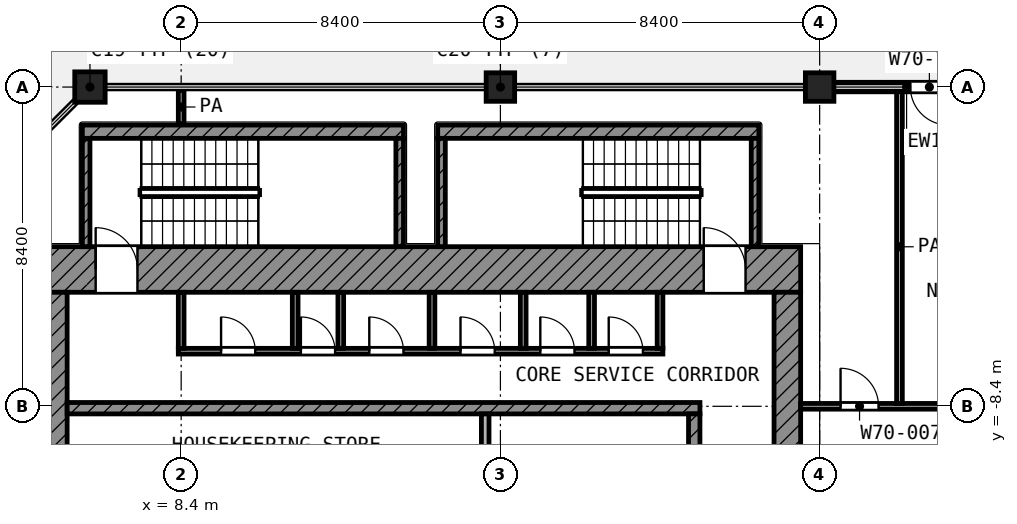
"""IFC4 building model, lengths in metres.
Left out: names, types, materials, properties, quantities, classifications, styles, units other than length and angle.
Written with IfcOpenShell. Run it as: python <this file> out.ifc"""

import sys

from ifc_helpers import new_model, si_unit, direction, frame, frame_2d, origin, origin_2d, place, context, subcontext, project, spatial, rectangle, extrude, element, fill, save


model = new_model("IFC4")
c1 = context("Model", 3, precision=1e-05, world=origin(), true_north=direction((0.0, 1.0)))
c2 = subcontext(c1, "Body", "Model", "MODEL_VIEW")
j1 = project(units=[si_unit("LENGTHUNIT", "METRE"), si_unit("PLANEANGLEUNIT", "RADIAN")], contexts=[c1])
p1 = place(None, origin())
s1 = spatial("IfcSite", under=j1, at=p1, CompositionType="ELEMENT")
p2 = place(p1, origin())
s2 = spatial("IfcBuilding", under=s1, at=p2, CompositionType="ELEMENT")
p3 = place(p2, frame((0.0, 0.0, 323.8)))
s3 = spatial("IfcBuildingStorey", under=s2, at=p3, CompositionType="ELEMENT", Elevation=323.8)
p4 = place(p3, frame((6.0, 0.0, 0.0), z_axis=(0.0, 0.0, 1.0), x_axis=(1.0, 0.0, 0.0)))
e1 = element("IfcColumn", 1, at=p4, inside=s3, PredefinedType="COLUMN", context=c2, shape_type="SweptSolid", body=[
    extrude(rectangle(XDim=0.8, YDim=0.8, at=origin_2d()), origin(), (0.0, 0.0, 1.0), 4.2),
])
for number, where, z_axis, x_axis in (
    (2, (16.8, 0.0, 0.0), (0.0, 0.0, 1.0), (1.0, 0.0, 0.0)),
    (3, (25.2, 0.0, 0.0), (0.0, 0.0, 1.0), (1.0, 0.0, 0.0)),
):
    element("IfcColumn", number, at=place(p3, frame(where, z_axis=z_axis, x_axis=x_axis)), inside=s3, PredefinedType="COLUMN", context=c2, shape_type="SweptSolid", body=[
        extrude(rectangle(XDim=0.75, YDim=0.75, at=origin_2d()), origin(), (0.0, 0.0, 1.0), 4.2),
    ])
p5 = place(p3, frame((29.4, 0.0, 0.0), z_axis=(0.0, 0.0, 1.0), x_axis=(-1.0, 0.0, 0.0)))
e4 = element("IfcWall", 4, at=p5, inside=s3, PredefinedType="SOLIDWALL", context=c2, shape_type="SweptSolid", body=[
    extrude(rectangle(XDim=3.825, YDim=0.25, at=frame_2d((1.913, 0.0))), origin(), (0.0, 0.0, 1.0), 3.48),
])
p6 = place(p5, frame((0.812, 0.0, 0.0)))
e5 = element("IfcOpeningElement", 5, at=p6, cuts=e4, PredefinedType="OPENING", context=c2, shape_type="SweptSolid", body=[
    extrude(rectangle(XDim=1.0, YDim=2.1, at=frame_2d((0.5, 1.05))), frame((0.0, 0.135, 0.0), z_axis=(0.0, -1.0, 0.0), x_axis=(1.0, 0.0, 0.0)), (0.0, 0.0, 1.0), 0.27),
])
p7 = place(p3, frame((4.2, -4.8, 0.0), z_axis=(0.0, 0.0, 1.0), x_axis=(1.0, 0.0, 0.0)))
e6 = element("IfcWall", 6, at=p7, inside=s3, PredefinedType="SHEAR", context=c2, shape_type="SweptSolid", body=[
    extrude(rectangle(XDim=20.5, YDim=1.2, at=frame_2d((10.25, 0.0))), origin(), (0.0, 0.0, 1.0), 3.6),
])
p8 = place(p7, frame((1.95, 0.0, 0.0)))
e7 = element("IfcOpeningElement", 7, at=p8, cuts=e6, PredefinedType="OPENING", context=c2, shape_type="SweptSolid", body=[
    extrude(rectangle(XDim=1.1, YDim=2.1, at=frame_2d((0.55, 1.05))), frame((0.0, 0.61, 0.0), z_axis=(0.0, -1.0, 0.0), x_axis=(1.0, 0.0, 0.0)), (0.0, 0.0, 1.0), 1.22),
])
p9 = place(p7, frame((17.95, 0.0, 0.0)))
e8 = element("IfcOpeningElement", 8, at=p9, cuts=e6, PredefinedType="OPENING", context=c2, shape_type="SweptSolid", body=[
    extrude(rectangle(XDim=1.1, YDim=2.1, at=frame_2d((0.55, 1.05))), frame((0.0, 0.61, 0.0), z_axis=(0.0, -1.0, 0.0), x_axis=(1.0, 0.0, 0.0)), (0.0, 0.0, 1.0), 1.22),
])
p10 = place(p3, frame((4.8, -24.7, 0.0), z_axis=(0.0, 0.0, 1.0), x_axis=(0.0, 1.0, 0.0)))
e9 = element("IfcWall", 9, at=p10, inside=s3, PredefinedType="SHEAR", context=c2, shape_type="SweptSolid", body=[
    extrude(rectangle(XDim=19.3, YDim=1.2, at=frame_2d((9.65, 0.0))), origin(), (0.0, 0.0, 1.0), 3.6),
])
p11 = place(p10, frame((11.15, 0.0, 0.0)))
e10 = element("IfcOpeningElement", 10, at=p11, cuts=e9, PredefinedType="OPENING", context=c2, shape_type="SweptSolid", body=[
    extrude(rectangle(XDim=1.1, YDim=2.1, at=frame_2d((0.55, 1.05))), frame((0.0, 0.61, 0.0), z_axis=(0.0, -1.0, 0.0), x_axis=(1.0, 0.0, 0.0)), (0.0, 0.0, 1.0), 1.22),
])
p12 = place(p10, frame((1.85, 0.0, 0.0)))
e11 = element("IfcOpeningElement", 11, at=p12, cuts=e9, PredefinedType="OPENING", context=c2, shape_type="SweptSolid", body=[
    extrude(rectangle(XDim=1.1, YDim=2.1, at=frame_2d((0.55, 1.05))), frame((0.0, 0.61, 0.0), z_axis=(0.0, -1.0, 0.0), x_axis=(1.0, 0.0, 0.0)), (0.0, 0.0, 1.0), 1.22),
])
p13 = place(p3, frame((24.35, -24.0, 0.0), z_axis=(0.0, 0.0, 1.0), x_axis=(0.0, 1.0, 0.0)))
e12 = element("IfcWall", 12, at=p13, inside=s3, PredefinedType="SHEAR", context=c2, shape_type="SweptSolid", body=[
    extrude(rectangle(XDim=18.6, YDim=0.7, at=frame_2d((9.3, 0.0))), origin(), (0.0, 0.0, 1.0), 3.6),
])
p14 = place(p13, frame((10.5, 0.0, 0.0)))
e13 = element("IfcOpeningElement", 13, at=p14, cuts=e12, PredefinedType="OPENING", context=c2, shape_type="SweptSolid", body=[
    extrude(rectangle(XDim=1.8, YDim=2.1, at=frame_2d((0.9, 1.05))), frame((0.0, 0.36, 0.0), z_axis=(0.0, -1.0, 0.0), x_axis=(1.0, 0.0, 0.0)), (0.0, 0.0, 1.0), 0.72),
])
p15 = place(p3, frame((5.4, -8.45, 0.0), z_axis=(0.0, 0.0, 1.0), x_axis=(1.0, 0.0, 0.0)))
e14 = element("IfcWall", 14, at=p15, inside=s3, PredefinedType="SHEAR", context=c2, shape_type="SweptSolid", body=[
    extrude(rectangle(XDim=16.65, YDim=0.3, at=frame_2d((8.325, 0.0))), origin(), (0.0, 0.0, 1.0), 3.6),
])
p16 = place(p3, frame((21.9, -10.95, 0.0), z_axis=(0.0, 0.0, 1.0), x_axis=(0.0, 1.0, 0.0)))
e15 = element("IfcWall", 15, at=p16, inside=s3, PredefinedType="SHEAR", context=c2, shape_type="SweptSolid", body=[
    extrude(rectangle(XDim=2.35, YDim=0.3, at=frame_2d((1.175, 0.0))), origin(), (0.0, 0.0, 1.0), 3.6),
])
p17 = place(p3, frame((16.4, -10.95, 0.0), z_axis=(0.0, 0.0, 1.0), x_axis=(0.0, 1.0, 0.0)))
e16 = element("IfcWall", 16, at=p17, inside=s3, PredefinedType="PARTITIONING", context=c2, shape_type="SweptSolid", body=[
    extrude(rectangle(XDim=2.35, YDim=0.2, at=frame_2d((1.175, 0.0))), origin(), (0.0, 0.0, 1.0), 3.6),
])
p18 = place(p3, frame((8.325, -6.95, 0.0), z_axis=(0.0, 0.0, 1.0), x_axis=(1.0, 0.0, 0.0)))
e17 = element("IfcWall", 17, at=p18, inside=s3, PredefinedType="PARTITIONING", context=c2, shape_type="SweptSolid", body=[
    extrude(rectangle(XDim=12.75, YDim=0.15, at=frame_2d((6.375, 0.0))), origin(), (0.0, 0.0, 1.0), 3.6),
])
p19 = place(p18, frame((1.125, 0.0, 0.0)))
e18 = element("IfcOpeningElement", 18, at=p19, cuts=e17, PredefinedType="OPENING", context=c2, shape_type="SweptSolid", body=[
    extrude(rectangle(XDim=0.9, YDim=2.1, at=frame_2d((0.45, 1.05))), frame((0.0, 0.085, 0.0), z_axis=(0.0, -1.0, 0.0), x_axis=(1.0, 0.0, 0.0)), (0.0, 0.0, 1.0), 0.17),
])
p20 = place(p18, frame((3.225, 0.0, 0.0)))
e19 = element("IfcOpeningElement", 19, at=p20, cuts=e17, PredefinedType="OPENING", context=c2, shape_type="SweptSolid", body=[
    extrude(rectangle(XDim=0.9, YDim=2.1, at=frame_2d((0.45, 1.05))), frame((0.0, 0.085, 0.0), z_axis=(0.0, -1.0, 0.0), x_axis=(1.0, 0.0, 0.0)), (0.0, 0.0, 1.0), 0.17),
])
p21 = place(p18, frame((5.025, 0.0, 0.0)))
e20 = element("IfcOpeningElement", 20, at=p21, cuts=e17, PredefinedType="OPENING", context=c2, shape_type="SweptSolid", body=[
    extrude(rectangle(XDim=0.9, YDim=2.1, at=frame_2d((0.45, 1.05))), frame((0.0, 0.085, 0.0), z_axis=(0.0, -1.0, 0.0), x_axis=(1.0, 0.0, 0.0)), (0.0, 0.0, 1.0), 0.17),
])
p22 = place(p18, frame((7.425, 0.0, 0.0)))
e21 = element("IfcOpeningElement", 21, at=p22, cuts=e17, PredefinedType="OPENING", context=c2, shape_type="SweptSolid", body=[
    extrude(rectangle(XDim=0.9, YDim=2.1, at=frame_2d((0.45, 1.05))), frame((0.0, 0.085, 0.0), z_axis=(0.0, -1.0, 0.0), x_axis=(1.0, 0.0, 0.0)), (0.0, 0.0, 1.0), 0.17),
])
p23 = place(p18, frame((9.525, 0.0, 0.0)))
e22 = element("IfcOpeningElement", 22, at=p23, cuts=e17, PredefinedType="OPENING", context=c2, shape_type="SweptSolid", body=[
    extrude(rectangle(XDim=0.9, YDim=2.1, at=frame_2d((0.45, 1.05))), frame((0.0, 0.085, 0.0), z_axis=(0.0, -1.0, 0.0), x_axis=(1.0, 0.0, 0.0)), (0.0, 0.0, 1.0), 0.17),
])
p24 = place(p18, frame((11.325, 0.0, 0.0)))
e23 = element("IfcOpeningElement", 23, at=p24, cuts=e17, PredefinedType="OPENING", context=c2, shape_type="SweptSolid", body=[
    extrude(rectangle(XDim=0.9, YDim=2.1, at=frame_2d((0.45, 1.05))), frame((0.0, 0.085, 0.0), z_axis=(0.0, -1.0, 0.0), x_axis=(1.0, 0.0, 0.0)), (0.0, 0.0, 1.0), 0.17),
])
for number, where, z_axis, x_axis in (
    (24, (8.4, -6.875, 0.0), (0.0, 0.0, 1.0), (0.0, 1.0, 0.0)),
    (25, (11.4, -6.875, 0.0), (0.0, 0.0, 1.0), (0.0, 1.0, 0.0)),
    (26, (12.6, -6.875, 0.0), (0.0, 0.0, 1.0), (0.0, 1.0, 0.0)),
    (27, (15.0, -6.875, 0.0), (0.0, 0.0, 1.0), (0.0, 1.0, 0.0)),
    (28, (17.4, -6.875, 0.0), (0.0, 0.0, 1.0), (0.0, 1.0, 0.0)),
    (29, (19.2, -6.875, 0.0), (0.0, 0.0, 1.0), (0.0, 1.0, 0.0)),
    (30, (21.0, -6.875, 0.0), (0.0, 0.0, 1.0), (0.0, 1.0, 0.0)),
):
    element("IfcWall", number, at=place(p3, frame(where, z_axis=z_axis, x_axis=x_axis)), inside=s3, PredefinedType="PARTITIONING", context=c2, shape_type="SweptSolid", body=[
        extrude(rectangle(XDim=1.475, YDim=0.15, at=frame_2d((0.738, 0.0))), origin(), (0.0, 0.0, 1.0), 3.6),
    ])
p25 = place(p3, frame((5.8, -1.175, 0.0), z_axis=(0.0, 0.0, 1.0), x_axis=(1.0, 0.0, 0.0)))
e31 = element("IfcWall", 31, at=p25, inside=s3, PredefinedType="SHEAR", context=c2, shape_type="SweptSolid", body=[
    extrude(rectangle(XDim=8.45, YDim=0.35, at=frame_2d((4.225, 0.0))), origin(), (0.0, 0.0, 1.0), 3.6),
])
for number, where, z_axis, x_axis in (
    (32, (5.9, -4.2, 0.0), (0.0, 0.0, 1.0), (0.0, 1.0, 0.0)),
    (33, (14.15, -4.2, 0.0), (0.0, 0.0, 1.0), (0.0, 1.0, 0.0)),
):
    element("IfcWall", number, at=place(p3, frame(where, z_axis=z_axis, x_axis=x_axis)), inside=s3, PredefinedType="SHEAR", context=c2, shape_type="SweptSolid", body=[
        extrude(rectangle(XDim=2.85, YDim=0.2, at=frame_2d((1.425, 0.0))), origin(), (0.0, 0.0, 1.0), 3.6),
    ])
p26 = place(p3, frame((15.15, -1.175, 0.0), z_axis=(0.0, 0.0, 1.0), x_axis=(1.0, 0.0, 0.0)))
e34 = element("IfcWall", 34, at=p26, inside=s3, PredefinedType="SHEAR", context=c2, shape_type="SweptSolid", body=[
    extrude(rectangle(XDim=8.45, YDim=0.35, at=frame_2d((4.225, 0.0))), origin(), (0.0, 0.0, 1.0), 3.6),
])
for number, where, z_axis, x_axis in (
    (35, (15.25, -4.2, 0.0), (0.0, 0.0, 1.0), (0.0, 1.0, 0.0)),
    (36, (23.5, -4.2, 0.0), (0.0, 0.0, 1.0), (0.0, 1.0, 0.0)),
):
    element("IfcWall", number, at=place(p3, frame(where, z_axis=z_axis, x_axis=x_axis)), inside=s3, PredefinedType="SHEAR", context=c2, shape_type="SweptSolid", body=[
        extrude(rectangle(XDim=2.85, YDim=0.2, at=frame_2d((1.425, 0.0))), origin(), (0.0, 0.0, 1.0), 3.6),
    ])
p27 = place(p3, frame((24.7, -8.4, 0.0), z_axis=(0.0, 0.0, 1.0), x_axis=(1.0, 0.0, 0.0)))
e37 = element("IfcWall", 37, at=p27, inside=s3, PredefinedType="PARTITIONING", context=c2, shape_type="SweptSolid", body=[
    extrude(rectangle(XDim=15.582, YDim=0.15, at=frame_2d((7.791, 0.0))), origin(), (0.0, 0.0, 1.0), 3.6),
])
p28 = place(p27, frame((9.35, 0.0, 0.0)))
e38 = element("IfcOpeningElement", 38, at=p28, cuts=e37, PredefinedType="OPENING", context=c2, shape_type="SweptSolid", body=[
    extrude(rectangle(XDim=1.1, YDim=2.1, at=frame_2d((0.55, 1.05))), frame((0.0, 0.085, 0.0), z_axis=(0.0, -1.0, 0.0), x_axis=(1.0, 0.0, 0.0)), (0.0, 0.0, 1.0), 0.17),
])
p29 = place(p27, frame((1.05, 0.0, 0.0)))
e39 = element("IfcOpeningElement", 39, at=p29, cuts=e37, PredefinedType="OPENING", context=c2, shape_type="SweptSolid", body=[
    extrude(rectangle(XDim=1.0, YDim=2.1, at=frame_2d((0.5, 1.05))), frame((0.0, 0.085, 0.0), z_axis=(0.0, -1.0, 0.0), x_axis=(1.0, 0.0, 0.0)), (0.0, 0.0, 1.0), 0.17),
])
p30 = place(p27, frame((5.15, 0.0, 0.0)))
e40 = element("IfcOpeningElement", 40, at=p30, cuts=e37, PredefinedType="OPENING", context=c2, shape_type="SweptSolid", body=[
    extrude(rectangle(XDim=1.2, YDim=2.1, at=frame_2d((0.6, 1.05))), frame((0.0, 0.085, 0.0), z_axis=(0.0, -1.0, 0.0), x_axis=(1.0, 0.0, 0.0)), (0.0, 0.0, 1.0), 0.17),
])
p31 = place(p3, frame((8.4, -0.97, 0.0), z_axis=(0.0, 0.0, 1.0), x_axis=(0.0, 1.0, 0.0)))
e41 = element("IfcWall", 41, at=p31, inside=s3, PredefinedType="PARTITIONING", context=c2, shape_type="SweptSolid", body=[
    extrude(rectangle(XDim=0.89, YDim=0.15, at=frame_2d((0.445, 0.0))), origin(), (0.0, 0.0, 1.0), 3.6),
])
p32 = place(p3, frame((27.3, -8.325, 0.0), z_axis=(0.0, 0.0, 1.0), x_axis=(0.0, 1.0, 0.0)))
e42 = element("IfcWall", 42, at=p32, inside=s3, PredefinedType="PARTITIONING", context=c2, shape_type="SweptSolid", body=[
    extrude(rectangle(XDim=8.245, YDim=0.15, at=frame_2d((4.123, 0.0))), origin(), (0.0, 0.0, 1.0), 3.6),
])
p33 = place(p6, origin())
e43 = element("IfcDoor", 43, at=p33, inside=s3, OperationType="SINGLE_SWING_LEFT", PredefinedType="DOOR", context=c2, shape_type="SweptSolid", body=[
    extrude(rectangle(XDim=1.0, YDim=2.1, at=frame_2d((0.5, 1.05))), frame((0.0, 0.025, 0.0), z_axis=(0.0, -1.0, 0.0), x_axis=(1.0, 0.0, 0.0)), (0.0, 0.0, 1.0), 0.05),
])
fill(e5, e43)
p34 = place(p8, origin())
e44 = element("IfcDoor", 44, at=p34, inside=s3, OperationType="SINGLE_SWING_LEFT", PredefinedType="DOOR", context=c2, shape_type="SweptSolid", body=[
    extrude(rectangle(XDim=1.1, YDim=2.1, at=frame_2d((0.55, 1.05))), frame((0.0, 0.025, 0.0), z_axis=(0.0, -1.0, 0.0), x_axis=(1.0, 0.0, 0.0)), (0.0, 0.0, 1.0), 0.05),
])
fill(e7, e44)
p35 = place(p9, origin())
e45 = element("IfcDoor", 45, at=p35, inside=s3, OperationType="SINGLE_SWING_LEFT", PredefinedType="DOOR", context=c2, shape_type="SweptSolid", body=[
    extrude(rectangle(XDim=1.1, YDim=2.1, at=frame_2d((0.55, 1.05))), frame((0.0, 0.025, 0.0), z_axis=(0.0, -1.0, 0.0), x_axis=(1.0, 0.0, 0.0)), (0.0, 0.0, 1.0), 0.05),
])
fill(e8, e45)
p36 = place(p19, origin())
e46 = element("IfcDoor", 46, at=p36, inside=s3, OperationType="SINGLE_SWING_LEFT", PredefinedType="DOOR", context=c2, shape_type="SweptSolid", body=[
    extrude(rectangle(XDim=0.9, YDim=2.1, at=frame_2d((0.45, 1.05))), frame((0.0, 0.025, 0.0), z_axis=(0.0, -1.0, 0.0), x_axis=(1.0, 0.0, 0.0)), (0.0, 0.0, 1.0), 0.05),
])
fill(e18, e46)
p37 = place(p20, origin())
e47 = element("IfcDoor", 47, at=p37, inside=s3, OperationType="SINGLE_SWING_LEFT", PredefinedType="DOOR", context=c2, shape_type="SweptSolid", body=[
    extrude(rectangle(XDim=0.9, YDim=2.1, at=frame_2d((0.45, 1.05))), frame((0.0, 0.025, 0.0), z_axis=(0.0, -1.0, 0.0), x_axis=(1.0, 0.0, 0.0)), (0.0, 0.0, 1.0), 0.05),
])
fill(e19, e47)
p38 = place(p21, origin())
e48 = element("IfcDoor", 48, at=p38, inside=s3, OperationType="SINGLE_SWING_LEFT", PredefinedType="DOOR", context=c2, shape_type="SweptSolid", body=[
    extrude(rectangle(XDim=0.9, YDim=2.1, at=frame_2d((0.45, 1.05))), frame((0.0, 0.025, 0.0), z_axis=(0.0, -1.0, 0.0), x_axis=(1.0, 0.0, 0.0)), (0.0, 0.0, 1.0), 0.05),
])
fill(e20, e48)
p39 = place(p22, origin())
e49 = element("IfcDoor", 49, at=p39, inside=s3, OperationType="SINGLE_SWING_LEFT", PredefinedType="DOOR", context=c2, shape_type="SweptSolid", body=[
    extrude(rectangle(XDim=0.9, YDim=2.1, at=frame_2d((0.45, 1.05))), frame((0.0, 0.025, 0.0), z_axis=(0.0, -1.0, 0.0), x_axis=(1.0, 0.0, 0.0)), (0.0, 0.0, 1.0), 0.05),
])
fill(e21, e49)
p40 = place(p23, origin())
e50 = element("IfcDoor", 50, at=p40, inside=s3, OperationType="SINGLE_SWING_LEFT", PredefinedType="DOOR", context=c2, shape_type="SweptSolid", body=[
    extrude(rectangle(XDim=0.9, YDim=2.1, at=frame_2d((0.45, 1.05))), frame((0.0, 0.025, 0.0), z_axis=(0.0, -1.0, 0.0), x_axis=(1.0, 0.0, 0.0)), (0.0, 0.0, 1.0), 0.05),
])
fill(e22, e50)
p41 = place(p24, origin())
e51 = element("IfcDoor", 51, at=p41, inside=s3, OperationType="SINGLE_SWING_LEFT", PredefinedType="DOOR", context=c2, shape_type="SweptSolid", body=[
    extrude(rectangle(XDim=0.9, YDim=2.1, at=frame_2d((0.45, 1.05))), frame((0.0, 0.025, 0.0), z_axis=(0.0, -1.0, 0.0), x_axis=(1.0, 0.0, 0.0)), (0.0, 0.0, 1.0), 0.05),
])
fill(e23, e51)
p42 = place(p29, origin())
e52 = element("IfcDoor", 52, at=p42, inside=s3, OperationType="SINGLE_SWING_LEFT", PredefinedType="DOOR", context=c2, shape_type="SweptSolid", body=[
    extrude(rectangle(XDim=1.0, YDim=2.1, at=frame_2d((0.5, 1.05))), frame((0.0, 0.025, 0.0), z_axis=(0.0, -1.0, 0.0), x_axis=(1.0, 0.0, 0.0)), (0.0, 0.0, 1.0), 0.05),
])
fill(e39, e52)
save(model, sys.argv[1])
